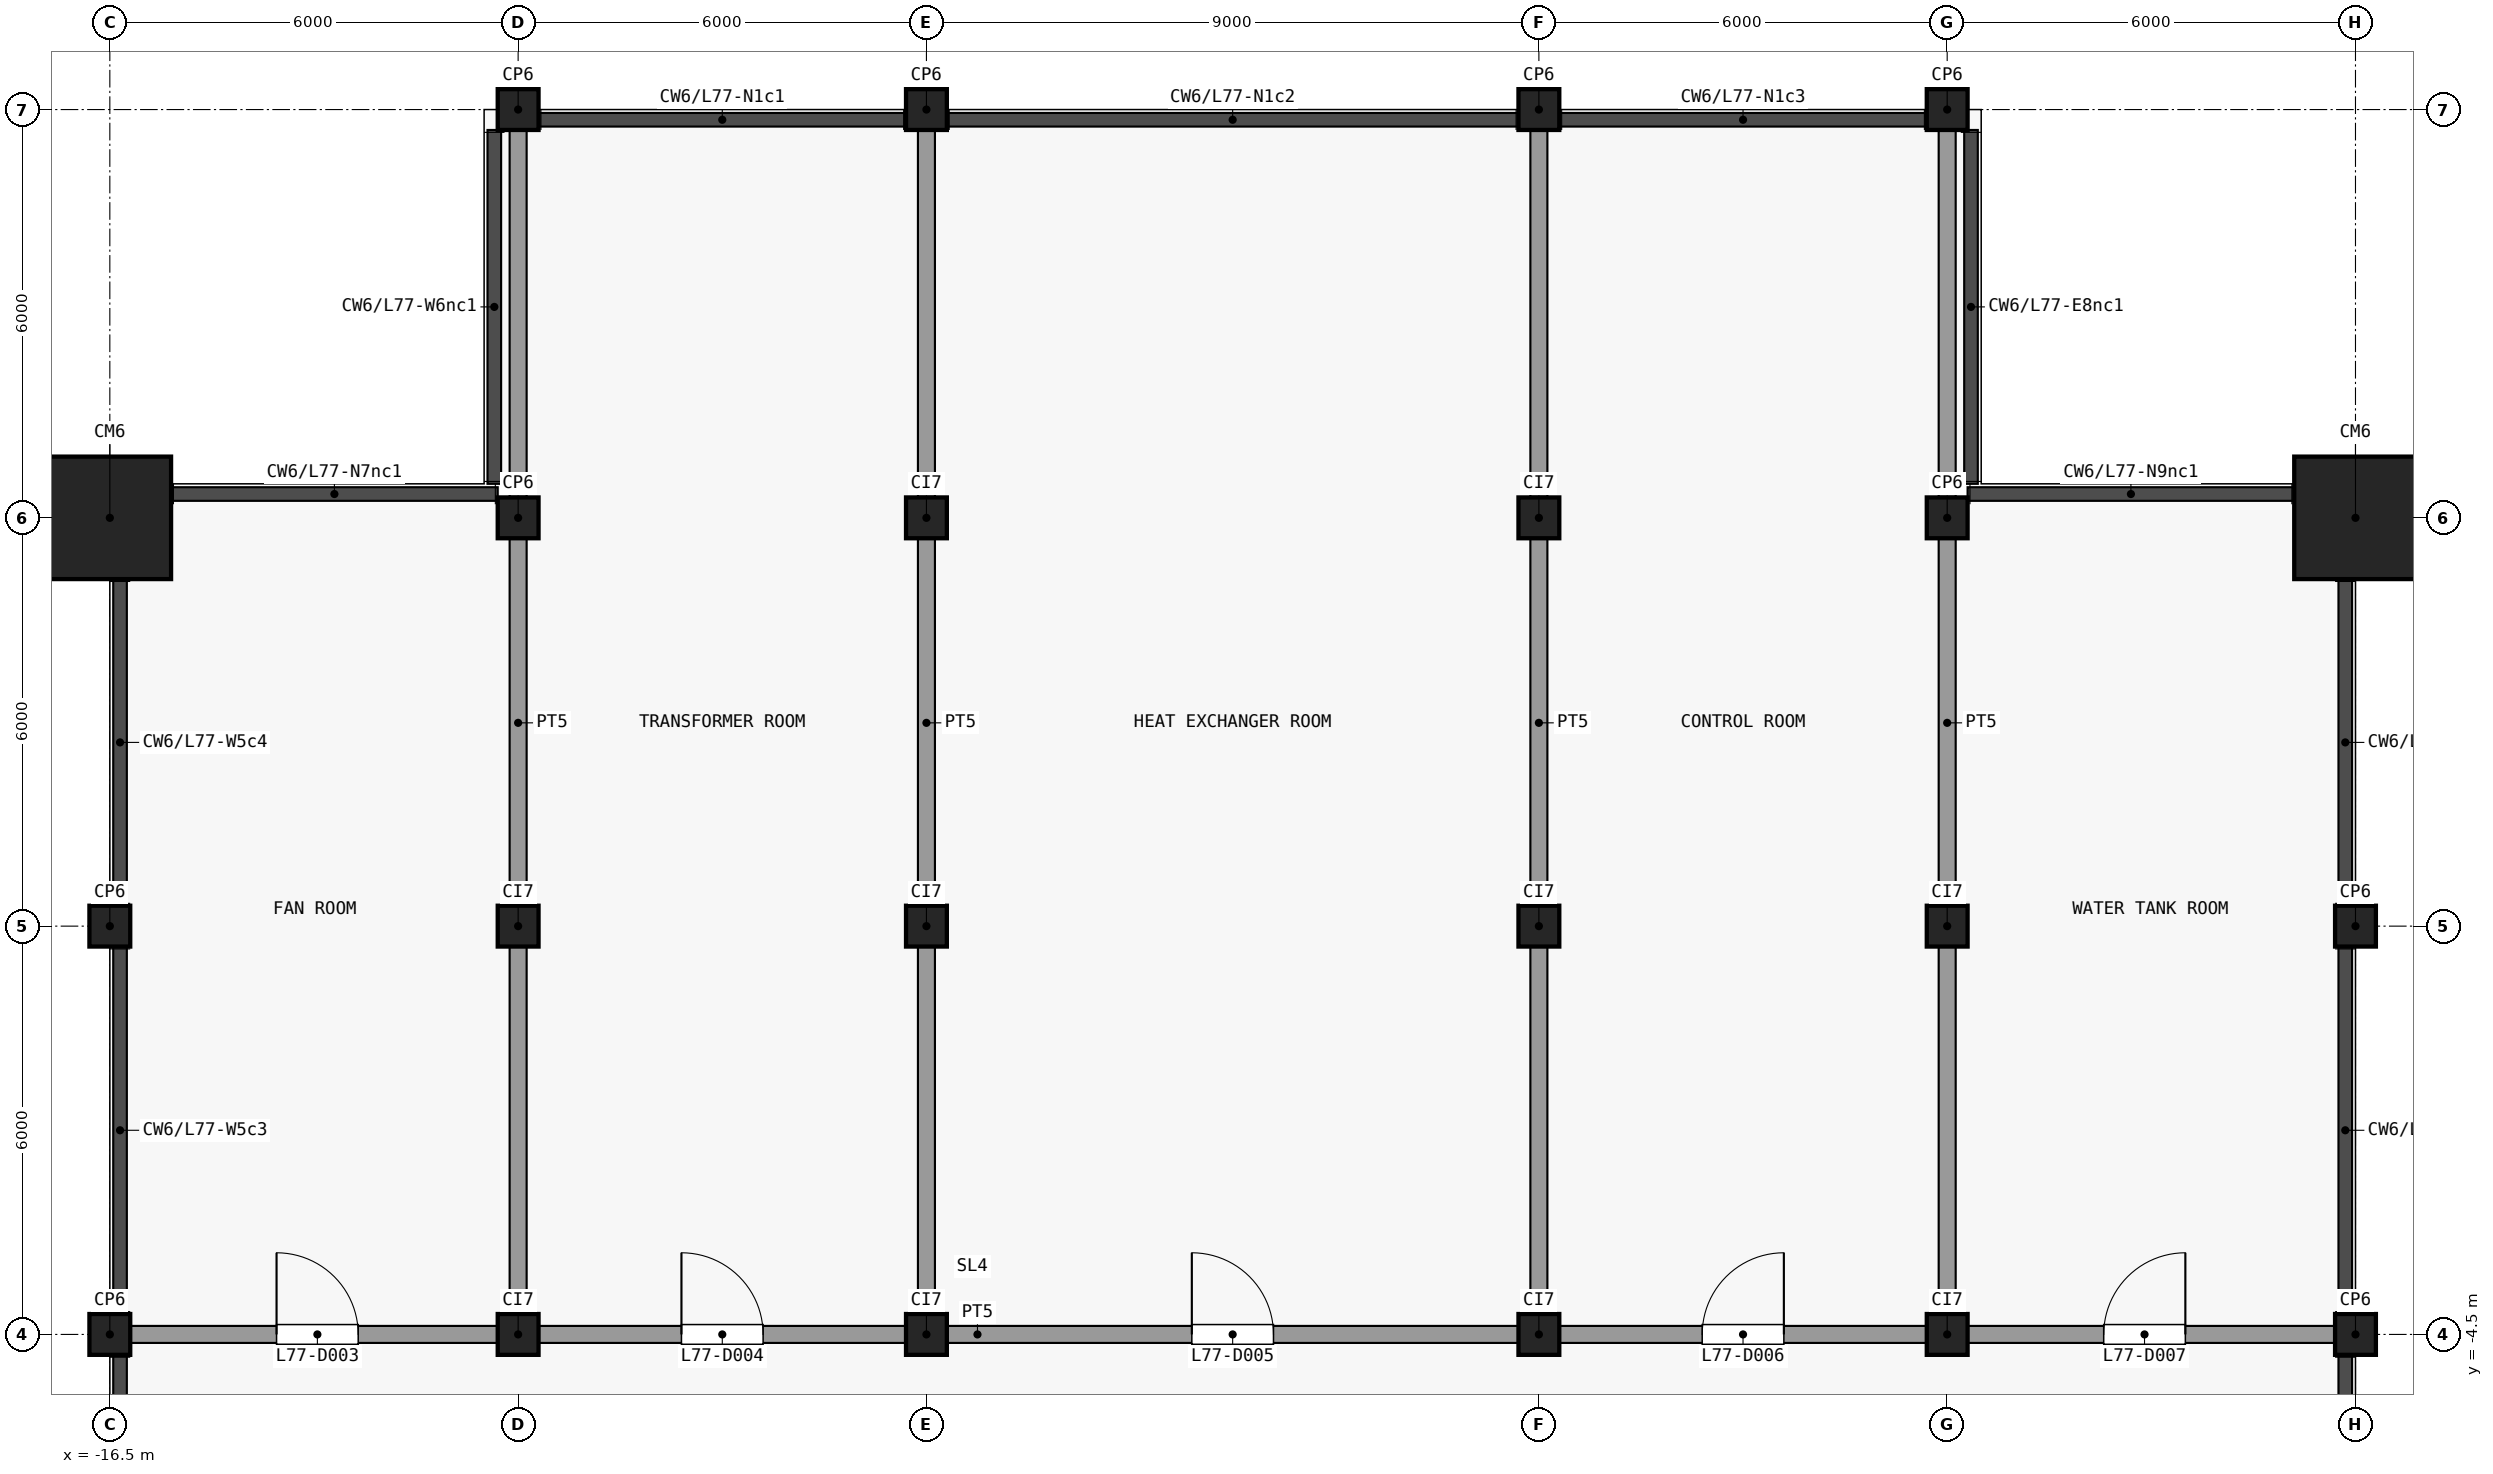
"""IFC4 building model, lengths in metres.
Left out: names, types, materials, properties, quantities, classifications, styles, units other than length and angle.
Written with IfcOpenShell. Run it as: python <this file> out.ifc"""

import sys

from ifc_helpers import new_model, si_unit, direction, frame, frame_2d, origin, origin_2d, place, context, subcontext, project, spatial, rectangle, extrude, element, fill, save


model = new_model("IFC4")
c1 = context("Model", 3, precision=1e-05, world=origin(), true_north=direction((0.0, 1.0)))
c2 = subcontext(c1, "Body", "Model", "MODEL_VIEW")
j1 = project(units=[si_unit("LENGTHUNIT", "METRE"), si_unit("PLANEANGLEUNIT", "RADIAN")], contexts=[c1])
p1 = place(None, origin())
s1 = spatial("IfcSite", under=j1, at=p1, CompositionType="ELEMENT")
p2 = place(p1, origin())
s2 = spatial("IfcBuilding", under=s1, at=p2, CompositionType="ELEMENT")
p3 = place(p2, frame((0.0, 0.0, 303.2)))
s3 = spatial("IfcBuildingStorey", under=s2, at=p3, CompositionType="ELEMENT", Elevation=303.2)
for number, where, z_axis, x_axis in (
    (1, (-16.5, -4.5, 0.0), (0.0, 0.0, 1.0), (1.0, 0.0, 0.0)),
    (2, (-16.5, 1.5, 0.0), (0.0, 0.0, 1.0), (1.0, 0.0, 0.0)),
):
    element("IfcColumn", number, at=place(p3, frame(where, z_axis=z_axis, x_axis=x_axis)), inside=s3, PredefinedType="COLUMN", context=c2, shape_type="SweptSolid", body=[
        extrude(rectangle(XDim=0.6, YDim=0.6, at=origin_2d()), origin(), (0.0, 0.0, 1.0), 4.5),
    ])
p4 = place(p3, frame((-16.5, 7.5, 0.0), z_axis=(0.0, 0.0, 1.0), x_axis=(1.0, 0.0, 0.0)))
e3 = element("IfcColumn", 3, at=p4, inside=s3, PredefinedType="COLUMN", context=c2, shape_type="SweptSolid", body=[
    extrude(rectangle(XDim=1.8, YDim=1.8, at=origin_2d()), origin(), (0.0, 0.0, 1.0), 4.5),
])
for number, where, z_axis, x_axis in (
    (4, (-10.5, -4.5, 0.0), (0.0, 0.0, 1.0), (1.0, 0.0, 0.0)),
    (5, (-10.5, 1.5, 0.0), (0.0, 0.0, 1.0), (1.0, 0.0, 0.0)),
    (6, (-10.5, 7.5, 0.0), (0.0, 0.0, 1.0), (1.0, 0.0, 0.0)),
    (7, (-10.5, 13.5, 0.0), (0.0, 0.0, 1.0), (1.0, 0.0, 0.0)),
    (8, (-4.5, -4.5, 0.0), (0.0, 0.0, 1.0), (1.0, 0.0, 0.0)),
    (9, (-4.5, 1.5, 0.0), (0.0, 0.0, 1.0), (1.0, 0.0, 0.0)),
    (10, (-4.5, 7.5, 0.0), (0.0, 0.0, 1.0), (1.0, 0.0, 0.0)),
    (11, (-4.5, 13.5, 0.0), (0.0, 0.0, 1.0), (1.0, 0.0, 0.0)),
    (12, (4.5, -4.5, 0.0), (0.0, 0.0, 1.0), (1.0, 0.0, 0.0)),
    (13, (4.5, 1.5, 0.0), (0.0, 0.0, 1.0), (1.0, 0.0, 0.0)),
    (14, (4.5, 7.5, 0.0), (0.0, 0.0, 1.0), (1.0, 0.0, 0.0)),
    (15, (4.5, 13.5, 0.0), (0.0, 0.0, 1.0), (1.0, 0.0, 0.0)),
    (16, (10.5, -4.5, 0.0), (0.0, 0.0, 1.0), (1.0, 0.0, 0.0)),
    (17, (10.5, 1.5, 0.0), (0.0, 0.0, 1.0), (1.0, 0.0, 0.0)),
    (18, (10.5, 7.5, 0.0), (0.0, 0.0, 1.0), (1.0, 0.0, 0.0)),
    (19, (10.5, 13.5, 0.0), (0.0, 0.0, 1.0), (1.0, 0.0, 0.0)),
    (20, (16.5, -4.5, 0.0), (0.0, 0.0, 1.0), (1.0, 0.0, 0.0)),
    (21, (16.5, 1.5, 0.0), (0.0, 0.0, 1.0), (1.0, 0.0, 0.0)),
):
    element("IfcColumn", number, at=place(p3, frame(where, z_axis=z_axis, x_axis=x_axis)), inside=s3, PredefinedType="COLUMN", context=c2, shape_type="SweptSolid", body=[
        extrude(rectangle(XDim=0.6, YDim=0.6, at=origin_2d()), origin(), (0.0, 0.0, 1.0), 4.5),
    ])
p5 = place(p3, frame((16.5, 7.5, 0.0), z_axis=(0.0, 0.0, 1.0), x_axis=(1.0, 0.0, 0.0)))
e22 = element("IfcColumn", 22, at=p5, inside=s3, PredefinedType="COLUMN", context=c2, shape_type="SweptSolid", body=[
    extrude(rectangle(XDim=1.8, YDim=1.8, at=origin_2d()), origin(), (0.0, 0.0, 1.0), 4.5),
])
p6 = place(p3, frame((-16.35, -4.5, 0.0), z_axis=(0.0, 0.0, 1.0), x_axis=(1.0, 0.0, 0.0)))
e23 = element("IfcWall", 23, at=p6, inside=s3, PredefinedType="PARTITIONING", context=c2, shape_type="SweptSolid", body=[
    extrude(rectangle(XDim=32.7, YDim=0.25, at=frame_2d((16.35, 0.0))), origin(), (0.0, 0.0, 1.0), 4.2),
])
p7 = place(p6, frame((2.3, 0.0, 0.0)))
e24 = element("IfcOpeningElement", 24, at=p7, cuts=e23, PredefinedType="OPENING", context=c2, shape_type="SweptSolid", body=[
    extrude(rectangle(XDim=1.2, YDim=2.1, at=frame_2d((0.6, 1.05))), frame((0.0, 0.135, 0.0), z_axis=(0.0, -1.0, 0.0), x_axis=(1.0, 0.0, 0.0)), (0.0, 0.0, 1.0), 0.27),
])
p8 = place(p6, frame((8.25, 0.0, 0.0)))
e25 = element("IfcOpeningElement", 25, at=p8, cuts=e23, PredefinedType="OPENING", context=c2, shape_type="SweptSolid", body=[
    extrude(rectangle(XDim=1.2, YDim=2.1, at=frame_2d((0.6, 1.05))), frame((0.0, 0.135, 0.0), z_axis=(0.0, -1.0, 0.0), x_axis=(1.0, 0.0, 0.0)), (0.0, 0.0, 1.0), 0.27),
])
p9 = place(p6, frame((15.75, 0.0, 0.0)))
e26 = element("IfcOpeningElement", 26, at=p9, cuts=e23, PredefinedType="OPENING", context=c2, shape_type="SweptSolid", body=[
    extrude(rectangle(XDim=1.2, YDim=2.1, at=frame_2d((0.6, 1.05))), frame((0.0, 0.135, 0.0), z_axis=(0.0, -1.0, 0.0), x_axis=(1.0, 0.0, 0.0)), (0.0, 0.0, 1.0), 0.27),
])
p10 = place(p6, frame((23.25, 0.0, 0.0)))
e27 = element("IfcOpeningElement", 27, at=p10, cuts=e23, PredefinedType="OPENING", context=c2, shape_type="SweptSolid", body=[
    extrude(rectangle(XDim=1.2, YDim=2.1, at=frame_2d((0.6, 1.05))), frame((0.0, 0.135, 0.0), z_axis=(0.0, -1.0, 0.0), x_axis=(1.0, 0.0, 0.0)), (0.0, 0.0, 1.0), 0.27),
])
p11 = place(p6, frame((29.15, 0.0, 0.0)))
e28 = element("IfcOpeningElement", 28, at=p11, cuts=e23, PredefinedType="OPENING", context=c2, shape_type="SweptSolid", body=[
    extrude(rectangle(XDim=1.2, YDim=2.1, at=frame_2d((0.6, 1.05))), frame((0.0, 0.135, 0.0), z_axis=(0.0, -1.0, 0.0), x_axis=(1.0, 0.0, 0.0)), (0.0, 0.0, 1.0), 0.27),
])
for number, where, z_axis, x_axis in (
    (29, (-10.5, -4.375, 0.0), (0.0, 0.0, 1.0), (0.0, 1.0, 0.0)),
    (30, (-4.5, -4.375, 0.0), (0.0, 0.0, 1.0), (0.0, 1.0, 0.0)),
    (31, (4.5, -4.375, 0.0), (0.0, 0.0, 1.0), (0.0, 1.0, 0.0)),
    (32, (10.5, -4.375, 0.0), (0.0, 0.0, 1.0), (0.0, 1.0, 0.0)),
):
    element("IfcWall", number, at=place(p3, frame(where, z_axis=z_axis, x_axis=x_axis)), inside=s3, PredefinedType="PARTITIONING", context=c2, shape_type="SweptSolid", body=[
        extrude(rectangle(XDim=17.725, YDim=0.25, at=frame_2d((8.863, 0.0))), origin(), (0.0, 0.0, 1.0), 4.2),
    ])
p12 = place(p7, origin())
e33 = element("IfcDoor", 33, at=p12, inside=s3, OperationType="SINGLE_SWING_RIGHT", PredefinedType="DOOR", context=c2, shape_type="SweptSolid", body=[
    extrude(rectangle(XDim=1.2, YDim=2.1, at=frame_2d((0.6, 1.05))), frame((0.0, 0.025, 0.0), z_axis=(0.0, -1.0, 0.0), x_axis=(1.0, 0.0, 0.0)), (0.0, 0.0, 1.0), 0.05),
])
fill(e24, e33)
p13 = place(p8, origin())
e34 = element("IfcDoor", 34, at=p13, inside=s3, OperationType="SINGLE_SWING_RIGHT", PredefinedType="DOOR", context=c2, shape_type="SweptSolid", body=[
    extrude(rectangle(XDim=1.2, YDim=2.1, at=frame_2d((0.6, 1.05))), frame((0.0, 0.025, 0.0), z_axis=(0.0, -1.0, 0.0), x_axis=(1.0, 0.0, 0.0)), (0.0, 0.0, 1.0), 0.05),
])
fill(e25, e34)
p14 = place(p9, origin())
e35 = element("IfcDoor", 35, at=p14, inside=s3, OperationType="SINGLE_SWING_RIGHT", PredefinedType="DOOR", context=c2, shape_type="SweptSolid", body=[
    extrude(rectangle(XDim=1.2, YDim=2.1, at=frame_2d((0.6, 1.05))), frame((0.0, 0.025, 0.0), z_axis=(0.0, -1.0, 0.0), x_axis=(1.0, 0.0, 0.0)), (0.0, 0.0, 1.0), 0.05),
])
fill(e26, e35)
p15 = place(p10, origin())
e36 = element("IfcDoor", 36, at=p15, inside=s3, OperationType="SINGLE_SWING_LEFT", PredefinedType="DOOR", context=c2, shape_type="SweptSolid", body=[
    extrude(rectangle(XDim=1.2, YDim=2.1, at=frame_2d((0.6, 1.05))), frame((0.0, 0.025, 0.0), z_axis=(0.0, -1.0, 0.0), x_axis=(1.0, 0.0, 0.0)), (0.0, 0.0, 1.0), 0.05),
])
fill(e27, e36)
p16 = place(p11, origin())
e37 = element("IfcDoor", 37, at=p16, inside=s3, OperationType="SINGLE_SWING_LEFT", PredefinedType="DOOR", context=c2, shape_type="SweptSolid", body=[
    extrude(rectangle(XDim=1.2, YDim=2.1, at=frame_2d((0.6, 1.05))), frame((0.0, 0.025, 0.0), z_axis=(0.0, -1.0, 0.0), x_axis=(1.0, 0.0, 0.0)), (0.0, 0.0, 1.0), 0.05),
])
fill(e28, e37)
save(model, sys.argv[1])
